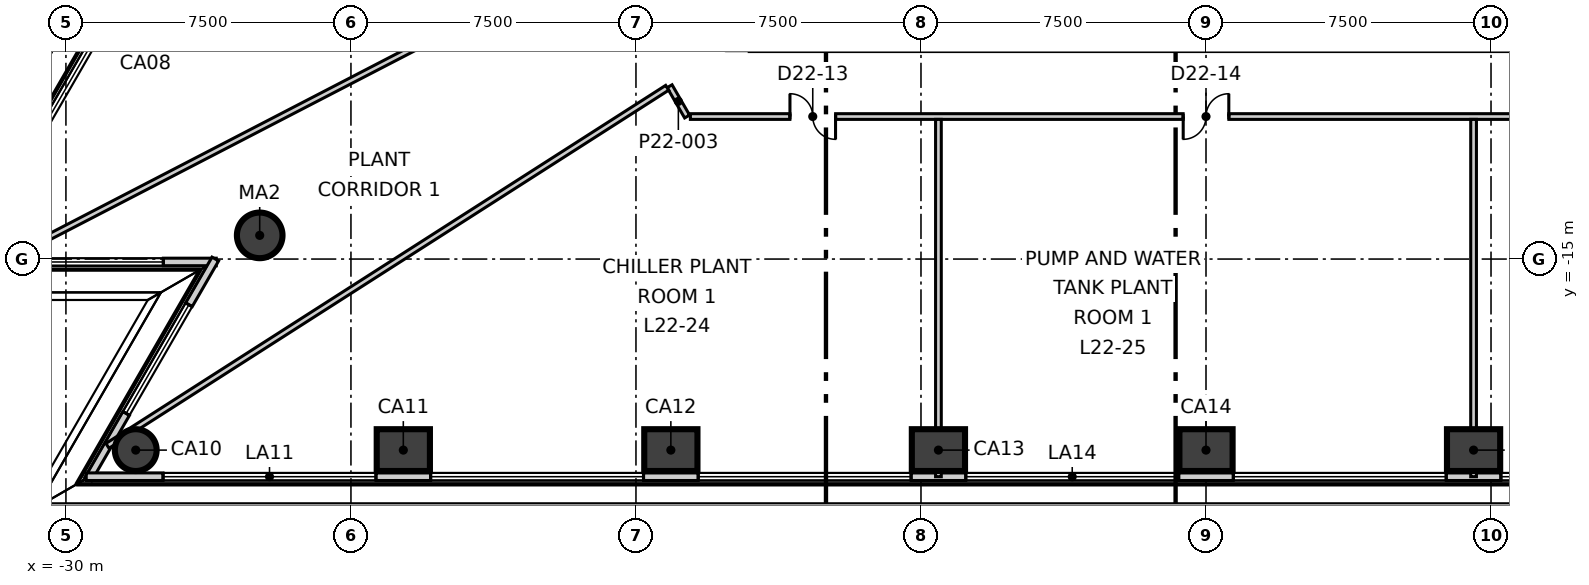
"""IFC4 building model, lengths in metres.
Left out: names, types, materials, properties, quantities, classifications, styles, units other than length and angle.
Written with IfcOpenShell. Run it as: python <this file> out.ifc"""

import sys

from ifc_helpers import new_model, si_unit, direction, frame, frame_2d, origin, origin_2d, place, context, subcontext, project, spatial, rectangle, circle, extrude, element, fill, save


model = new_model("IFC4")
c1 = context("Model", 3, precision=1e-05, world=origin(), true_north=direction((0.0, 1.0)))
c2 = subcontext(c1, "Body", "Model", "MODEL_VIEW")
j1 = project(units=[si_unit("LENGTHUNIT", "METRE"), si_unit("PLANEANGLEUNIT", "RADIAN")], contexts=[c1])
p1 = place(None, origin())
s1 = spatial("IfcSite", under=j1, at=p1, CompositionType="ELEMENT")
p2 = place(p1, origin())
s2 = spatial("IfcBuilding", under=s1, at=p2, CompositionType="ELEMENT")
p3 = place(p2, frame((0.0, 0.0, 99.8)))
s3 = spatial("IfcBuildingStorey", under=s2, at=p3, CompositionType="ELEMENT", Elevation=99.8)
p4 = place(p3, frame((-28.163, -20.027, -0.6), z_axis=(0.0, 0.0, 1.0), x_axis=(1.0, 0.0, 0.0)))
e1 = element("IfcColumn", 1, at=p4, inside=s3, PredefinedType="COLUMN", context=c2, shape_type="SweptSolid", body=[
    extrude(circle(Radius=0.55, at=origin_2d()), origin(), (0.0, 0.0, 1.0), 4.8),
])
for number, where, z_axis, x_axis in (
    (2, (-21.122, -20.027, -0.6), (0.0, 0.0, 1.0), (1.0, 0.0, 0.0)),
    (3, (-14.082, -20.027, -0.6), (0.0, 0.0, 1.0), (1.0, 0.0, 0.0)),
    (4, (-7.041, -20.027, -0.6), (0.0, 0.0, 1.0), (1.0, 0.0, 0.0)),
    (5, (0.0, -20.027, -0.6), (0.0, 0.0, 1.0), (1.0, 0.0, 0.0)),
    (6, (7.041, -20.027, -0.6), (0.0, 0.0, 1.0), (1.0, 0.0, 0.0)),
):
    element("IfcColumn", number, at=place(p3, frame(where, z_axis=z_axis, x_axis=x_axis)), inside=s3, PredefinedType="COLUMN", context=c2, shape_type="SweptSolid", body=[
        extrude(rectangle(XDim=1.4, YDim=1.1, at=origin_2d()), origin(), (0.0, 0.0, 1.0), 4.8),
    ])
p5 = place(p3, frame((-24.901, -14.377, -0.6), z_axis=(0.0, 0.0, 1.0), x_axis=(1.0, 0.0, 0.0)))
e7 = element("IfcColumn", 7, at=p5, inside=s3, PredefinedType="COLUMN", context=c2, shape_type="SweptSolid", body=[
    extrude(circle(Radius=0.6, at=origin_2d()), origin(), (0.0, 0.0, 1.0), 4.8),
])
p6 = place(p3, frame((-3.217, 35.882, 0.0), z_axis=(0.0, 0.0, 1.0), x_axis=(-0.499995323711, -0.866028103624, 0.0)))
e8 = element("IfcWall", 8, at=p6, inside=s3, PredefinedType="ELEMENTEDWALL", context=c2, shape_type="SweptSolid", body=[
    extrude(rectangle(XDim=58.913, YDim=0.2, at=frame_2d((29.456, 0.0))), origin(), (0.0, 0.0, 1.0), 4.2),
])
p7 = place(p6, frame((2.023, 0.0, 0.6)))
e9 = element("IfcOpeningElement", 9, at=p7, cuts=e8, PredefinedType="OPENING", context=c2, shape_type="SweptSolid", body=[
    extrude(rectangle(XDim=5.6, YDim=3.0, at=frame_2d((2.8, 1.5))), frame((0.0, 0.11, 0.0), z_axis=(0.0, -1.0, 0.0), x_axis=(1.0, 0.0, 0.0)), (0.0, 0.0, 1.0), 0.22),
])
p8 = place(p6, frame((9.064, 0.0, 0.6)))
e10 = element("IfcOpeningElement", 10, at=p8, cuts=e8, PredefinedType="OPENING", context=c2, shape_type="SweptSolid", body=[
    extrude(rectangle(XDim=5.6, YDim=3.0, at=frame_2d((2.8, 1.5))), frame((0.0, 0.11, 0.0), z_axis=(0.0, -1.0, 0.0), x_axis=(1.0, 0.0, 0.0)), (0.0, 0.0, 1.0), 0.22),
])
p9 = place(p6, frame((16.105, 0.0, 0.6)))
e11 = element("IfcOpeningElement", 11, at=p9, cuts=e8, PredefinedType="OPENING", context=c2, shape_type="SweptSolid", body=[
    extrude(rectangle(XDim=5.6, YDim=3.0, at=frame_2d((2.8, 1.5))), frame((0.0, 0.11, 0.0), z_axis=(0.0, -1.0, 0.0), x_axis=(1.0, 0.0, 0.0)), (0.0, 0.0, 1.0), 0.22),
])
p10 = place(p6, frame((23.146, 0.0, 0.6)))
e12 = element("IfcOpeningElement", 12, at=p10, cuts=e8, PredefinedType="OPENING", context=c2, shape_type="SweptSolid", body=[
    extrude(rectangle(XDim=5.6, YDim=3.0, at=frame_2d((2.8, 1.5))), frame((0.0, 0.11, 0.0), z_axis=(0.0, -1.0, 0.0), x_axis=(1.0, 0.0, 0.0)), (0.0, 0.0, 1.0), 0.22),
])
p11 = place(p6, frame((30.186, 0.0, 0.6)))
e13 = element("IfcOpeningElement", 13, at=p11, cuts=e8, PredefinedType="OPENING", context=c2, shape_type="SweptSolid", body=[
    extrude(rectangle(XDim=5.6, YDim=3.0, at=frame_2d((2.8, 1.5))), frame((0.0, 0.11, 0.0), z_axis=(0.0, -1.0, 0.0), x_axis=(1.0, 0.0, 0.0)), (0.0, 0.0, 1.0), 0.22),
])
p12 = place(p6, frame((37.227, 0.0, 0.6)))
e14 = element("IfcOpeningElement", 14, at=p12, cuts=e8, PredefinedType="OPENING", context=c2, shape_type="SweptSolid", body=[
    extrude(rectangle(XDim=5.6, YDim=3.0, at=frame_2d((2.8, 1.5))), frame((0.0, 0.11, 0.0), z_axis=(0.0, -1.0, 0.0), x_axis=(1.0, 0.0, 0.0)), (0.0, 0.0, 1.0), 0.22),
])
p13 = place(p6, frame((44.268, 0.0, 0.6)))
e15 = element("IfcOpeningElement", 15, at=p13, cuts=e8, PredefinedType="OPENING", context=c2, shape_type="SweptSolid", body=[
    extrude(rectangle(XDim=5.6, YDim=3.0, at=frame_2d((2.8, 1.5))), frame((0.0, 0.11, 0.0), z_axis=(0.0, -1.0, 0.0), x_axis=(1.0, 0.0, 0.0)), (0.0, 0.0, 1.0), 0.22),
])
p14 = place(p6, frame((51.309, 0.0, 0.6)))
e16 = element("IfcOpeningElement", 16, at=p14, cuts=e8, PredefinedType="OPENING", context=c2, shape_type="SweptSolid", body=[
    extrude(rectangle(XDim=5.6, YDim=3.0, at=frame_2d((2.8, 1.5))), frame((0.0, 0.11, 0.0), z_axis=(0.0, -1.0, 0.0), x_axis=(1.0, 0.0, 0.0)), (0.0, 0.0, 1.0), 0.22),
])
p15 = place(p3, frame((-32.728, -15.077, 0.0), z_axis=(0.0, 0.0, 1.0), x_axis=(1.0, 0.0, 0.0)))
e17 = element("IfcWall", 17, at=p15, inside=s3, PredefinedType="ELEMENTEDWALL", context=c2, shape_type="SweptSolid", body=[
    extrude(rectangle(XDim=6.684, YDim=0.2, at=frame_2d((3.342, 0.0))), origin(), (0.0, 0.0, 1.0), 4.2),
])
p16 = place(p15, frame((1.99, 0.0, 0.6)))
e18 = element("IfcOpeningElement", 18, at=p16, cuts=e17, PredefinedType="OPENING", context=c2, shape_type="SweptSolid", body=[
    extrude(rectangle(XDim=3.3, YDim=3.0, at=frame_2d((1.65, 1.5))), frame((0.0, 0.11, 0.0), z_axis=(0.0, -1.0, 0.0), x_axis=(1.0, 0.0, 0.0)), (0.0, 0.0, 1.0), 0.22),
])
p17 = place(p3, frame((-26.069, -14.999, 0.0), z_axis=(0.0, 0.0, 1.0), x_axis=(-0.499941663064, -0.866059082011, 0.0)))
e19 = element("IfcWall", 19, at=p17, inside=s3, PredefinedType="ELEMENTEDWALL", context=c2, shape_type="SweptSolid", body=[
    extrude(rectangle(XDim=6.684, YDim=0.2, at=frame_2d((3.342, 0.0))), origin(), (0.0, 0.0, 1.0), 4.2),
])
p18 = place(p17, frame((1.39, 0.0, 0.6)))
e20 = element("IfcOpeningElement", 20, at=p18, cuts=e19, PredefinedType="OPENING", context=c2, shape_type="SweptSolid", body=[
    extrude(rectangle(XDim=3.3, YDim=3.0, at=frame_2d((1.65, 1.5))), frame((0.0, 0.11, 0.0), z_axis=(0.0, -1.0, 0.0), x_axis=(1.0, 0.0, 0.0)), (0.0, 0.0, 1.0), 0.22),
])
p19 = place(p3, frame((-29.466, -20.727, 0.0), z_axis=(0.0, 0.0, 1.0), x_axis=(1.0, 0.0, 0.0)))
e21 = element("IfcWall", 21, at=p19, inside=s3, PredefinedType="ELEMENTEDWALL", context=c2, shape_type="SweptSolid", body=[
    extrude(rectangle(XDim=58.912, YDim=0.2, at=frame_2d((29.456, 0.0))), origin(), (0.0, 0.0, 1.0), 4.2),
])
p20 = place(p19, frame((2.023, 0.0, 0.6)))
e22 = element("IfcOpeningElement", 22, at=p20, cuts=e21, PredefinedType="OPENING", context=c2, shape_type="SweptSolid", body=[
    extrude(rectangle(XDim=5.6, YDim=3.0, at=frame_2d((2.8, 1.5))), frame((0.0, 0.11, 0.0), z_axis=(0.0, -1.0, 0.0), x_axis=(1.0, 0.0, 0.0)), (0.0, 0.0, 1.0), 0.22),
])
p21 = place(p19, frame((9.064, 0.0, 0.6)))
e23 = element("IfcOpeningElement", 23, at=p21, cuts=e21, PredefinedType="OPENING", context=c2, shape_type="SweptSolid", body=[
    extrude(rectangle(XDim=5.6, YDim=3.0, at=frame_2d((2.8, 1.5))), frame((0.0, 0.11, 0.0), z_axis=(0.0, -1.0, 0.0), x_axis=(1.0, 0.0, 0.0)), (0.0, 0.0, 1.0), 0.22),
])
p22 = place(p19, frame((16.105, 0.0, 0.6)))
e24 = element("IfcOpeningElement", 24, at=p22, cuts=e21, PredefinedType="OPENING", context=c2, shape_type="SweptSolid", body=[
    extrude(rectangle(XDim=5.6, YDim=3.0, at=frame_2d((2.8, 1.5))), frame((0.0, 0.11, 0.0), z_axis=(0.0, -1.0, 0.0), x_axis=(1.0, 0.0, 0.0)), (0.0, 0.0, 1.0), 0.22),
])
p23 = place(p19, frame((23.146, 0.0, 0.6)))
e25 = element("IfcOpeningElement", 25, at=p23, cuts=e21, PredefinedType="OPENING", context=c2, shape_type="SweptSolid", body=[
    extrude(rectangle(XDim=5.6, YDim=3.0, at=frame_2d((2.8, 1.5))), frame((0.0, 0.11, 0.0), z_axis=(0.0, -1.0, 0.0), x_axis=(1.0, 0.0, 0.0)), (0.0, 0.0, 1.0), 0.22),
])
p24 = place(p19, frame((30.186, 0.0, 0.6)))
e26 = element("IfcOpeningElement", 26, at=p24, cuts=e21, PredefinedType="OPENING", context=c2, shape_type="SweptSolid", body=[
    extrude(rectangle(XDim=5.6, YDim=3.0, at=frame_2d((2.8, 1.5))), frame((0.0, 0.11, 0.0), z_axis=(0.0, -1.0, 0.0), x_axis=(1.0, 0.0, 0.0)), (0.0, 0.0, 1.0), 0.22),
])
p25 = place(p19, frame((37.227, 0.0, 0.6)))
e27 = element("IfcOpeningElement", 27, at=p25, cuts=e21, PredefinedType="OPENING", context=c2, shape_type="SweptSolid", body=[
    extrude(rectangle(XDim=5.6, YDim=3.0, at=frame_2d((2.8, 1.5))), frame((0.0, 0.11, 0.0), z_axis=(0.0, -1.0, 0.0), x_axis=(1.0, 0.0, 0.0)), (0.0, 0.0, 1.0), 0.22),
])
p26 = place(p19, frame((44.268, 0.0, 0.6)))
e28 = element("IfcOpeningElement", 28, at=p26, cuts=e21, PredefinedType="OPENING", context=c2, shape_type="SweptSolid", body=[
    extrude(rectangle(XDim=5.6, YDim=3.0, at=frame_2d((2.8, 1.5))), frame((0.0, 0.11, 0.0), z_axis=(0.0, -1.0, 0.0), x_axis=(1.0, 0.0, 0.0)), (0.0, 0.0, 1.0), 0.22),
])
p27 = place(p19, frame((51.309, 0.0, 0.6)))
e29 = element("IfcOpeningElement", 29, at=p27, cuts=e21, PredefinedType="OPENING", context=c2, shape_type="SweptSolid", body=[
    extrude(rectangle(XDim=5.6, YDim=3.0, at=frame_2d((2.8, 1.5))), frame((0.0, 0.11, 0.0), z_axis=(0.0, -1.0, 0.0), x_axis=(1.0, 0.0, 0.0)), (0.0, 0.0, 1.0), 0.22),
])
p28 = place(p3, frame((32.683, -15.155, 0.0), z_axis=(0.0, 0.0, 1.0), x_axis=(-0.499995323711, 0.866028103624, 0.0)))
e30 = element("IfcWall", 30, at=p28, inside=s3, PredefinedType="ELEMENTEDWALL", context=c2, shape_type="SweptSolid", body=[
    extrude(rectangle(XDim=58.913, YDim=0.2, at=frame_2d((29.456, 0.0))), origin(), (0.0, 0.0, 1.0), 4.2),
])
p29 = place(p28, frame((2.023, 0.0, 0.6)))
e31 = element("IfcOpeningElement", 31, at=p29, cuts=e30, PredefinedType="OPENING", context=c2, shape_type="SweptSolid", body=[
    extrude(rectangle(XDim=5.6, YDim=3.0, at=frame_2d((2.8, 1.5))), frame((0.0, 0.11, 0.0), z_axis=(0.0, -1.0, 0.0), x_axis=(1.0, 0.0, 0.0)), (0.0, 0.0, 1.0), 0.22),
])
p30 = place(p28, frame((9.064, 0.0, 0.6)))
e32 = element("IfcOpeningElement", 32, at=p30, cuts=e30, PredefinedType="OPENING", context=c2, shape_type="SweptSolid", body=[
    extrude(rectangle(XDim=5.6, YDim=3.0, at=frame_2d((2.8, 1.5))), frame((0.0, 0.11, 0.0), z_axis=(0.0, -1.0, 0.0), x_axis=(1.0, 0.0, 0.0)), (0.0, 0.0, 1.0), 0.22),
])
p31 = place(p28, frame((16.105, 0.0, 0.6)))
e33 = element("IfcOpeningElement", 33, at=p31, cuts=e30, PredefinedType="OPENING", context=c2, shape_type="SweptSolid", body=[
    extrude(rectangle(XDim=5.6, YDim=3.0, at=frame_2d((2.8, 1.5))), frame((0.0, 0.11, 0.0), z_axis=(0.0, -1.0, 0.0), x_axis=(1.0, 0.0, 0.0)), (0.0, 0.0, 1.0), 0.22),
])
p32 = place(p28, frame((23.146, 0.0, 0.6)))
e34 = element("IfcOpeningElement", 34, at=p32, cuts=e30, PredefinedType="OPENING", context=c2, shape_type="SweptSolid", body=[
    extrude(rectangle(XDim=5.6, YDim=3.0, at=frame_2d((2.8, 1.5))), frame((0.0, 0.11, 0.0), z_axis=(0.0, -1.0, 0.0), x_axis=(1.0, 0.0, 0.0)), (0.0, 0.0, 1.0), 0.22),
])
p33 = place(p28, frame((30.187, 0.0, 0.6)))
e35 = element("IfcOpeningElement", 35, at=p33, cuts=e30, PredefinedType="OPENING", context=c2, shape_type="SweptSolid", body=[
    extrude(rectangle(XDim=5.6, YDim=3.0, at=frame_2d((2.8, 1.5))), frame((0.0, 0.11, 0.0), z_axis=(0.0, -1.0, 0.0), x_axis=(1.0, 0.0, 0.0)), (0.0, 0.0, 1.0), 0.22),
])
p34 = place(p28, frame((37.228, 0.0, 0.6)))
e36 = element("IfcOpeningElement", 36, at=p34, cuts=e30, PredefinedType="OPENING", context=c2, shape_type="SweptSolid", body=[
    extrude(rectangle(XDim=5.6, YDim=3.0, at=frame_2d((2.8, 1.5))), frame((0.0, 0.11, 0.0), z_axis=(0.0, -1.0, 0.0), x_axis=(1.0, 0.0, 0.0)), (0.0, 0.0, 1.0), 0.22),
])
p35 = place(p28, frame((44.268, 0.0, 0.6)))
e37 = element("IfcOpeningElement", 37, at=p35, cuts=e30, PredefinedType="OPENING", context=c2, shape_type="SweptSolid", body=[
    extrude(rectangle(XDim=5.6, YDim=3.0, at=frame_2d((2.8, 1.5))), frame((0.0, 0.11, 0.0), z_axis=(0.0, -1.0, 0.0), x_axis=(1.0, 0.0, 0.0)), (0.0, 0.0, 1.0), 0.22),
])
p36 = place(p28, frame((51.309, 0.0, 0.6)))
e38 = element("IfcOpeningElement", 38, at=p36, cuts=e30, PredefinedType="OPENING", context=c2, shape_type="SweptSolid", body=[
    extrude(rectangle(XDim=5.6, YDim=3.0, at=frame_2d((2.8, 1.5))), frame((0.0, 0.11, 0.0), z_axis=(0.0, -1.0, 0.0), x_axis=(1.0, 0.0, 0.0)), (0.0, 0.0, 1.0), 0.22),
])
p37 = place(p3, frame((-14.115, -10.452, 0.0), z_axis=(0.0, 0.0, 1.0), x_axis=(0.500127537037, -0.865951757719, 0.0)))
e39 = element("IfcWall", 39, at=p37, inside=s3, PredefinedType="PARTITIONING", context=c2, shape_type="SweptSolid", body=[
    extrude(rectangle(XDim=0.922, YDim=0.15, at=frame_2d((0.461, 0.0))), origin(), (0.0, 0.0, 1.0), 4.2),
])
p38 = place(p3, frame((-31.713, -15.077, 0.0), z_axis=(0.0, 0.0, 1.0), x_axis=(0.887959302536, 0.459922033654, 0.0)))
e40 = element("IfcWall", 40, at=p38, inside=s3, PredefinedType="PARTITIONING", context=c2, shape_type="SweptSolid", body=[
    extrude(rectangle(XDim=17.496, YDim=0.15, at=frame_2d((8.748, 0.0))), origin(), (0.0, 0.0, 1.0), 3.4),
])
p39 = place(p3, frame((-28.907, -19.915, 0.0), z_axis=(0.0, 0.0, 1.0), x_axis=(0.842386762203, 0.53887340152, 0.0)))
e41 = element("IfcWall", 41, at=p39, inside=s3, PredefinedType="PARTITIONING", context=c2, shape_type="SweptSolid", body=[
    extrude(rectangle(XDim=17.485, YDim=0.15, at=frame_2d((8.742, 0.0))), origin(), (0.0, 0.0, 1.0), 3.4),
])
p40 = place(p3, frame((-13.568, -11.25, 0.0), z_axis=(0.0, 0.0, 1.0), x_axis=(1.0, 0.0, 0.0)))
e42 = element("IfcWall", 42, at=p40, inside=s3, PredefinedType="PARTITIONING", context=c2, shape_type="SweptSolid", body=[
    extrude(rectangle(XDim=27.222, YDim=0.15, at=frame_2d((13.611, 0.0))), origin(), (0.0, 0.0, 1.0), 4.2),
])
p41 = place(p40, frame((2.62, 0.0, 0.0)))
e43 = element("IfcOpeningElement", 43, at=p41, cuts=e42, PredefinedType="OPENING", context=c2, shape_type="SweptSolid", body=[
    extrude(rectangle(XDim=1.2, YDim=2.1, at=frame_2d((0.6, 1.05))), frame((0.0, 0.085, 0.0), z_axis=(0.0, -1.0, 0.0), x_axis=(1.0, 0.0, 0.0)), (0.0, 0.0, 1.0), 0.17),
])
p42 = place(p40, frame((12.968, 0.0, 0.0)))
e44 = element("IfcOpeningElement", 44, at=p42, cuts=e42, PredefinedType="OPENING", context=c2, shape_type="SweptSolid", body=[
    extrude(rectangle(XDim=1.2, YDim=2.1, at=frame_2d((0.6, 1.05))), frame((0.0, 0.085, 0.0), z_axis=(0.0, -1.0, 0.0), x_axis=(1.0, 0.0, 0.0)), (0.0, 0.0, 1.0), 0.17),
])
p43 = place(p40, frame((23.316, 0.0, 0.0)))
e45 = element("IfcOpeningElement", 45, at=p43, cuts=e42, PredefinedType="OPENING", context=c2, shape_type="SweptSolid", body=[
    extrude(rectangle(XDim=1.2, YDim=2.1, at=frame_2d((0.6, 1.05))), frame((0.0, 0.085, 0.0), z_axis=(0.0, -1.0, 0.0), x_axis=(1.0, 0.0, 0.0)), (0.0, 0.0, 1.0), 0.17),
])
for number, where, z_axis, x_axis in (
    (46, (-7.041, -20.727, 0.0), (0.0, 0.0, 1.0), (0.0, 1.0, 0.0)),
    (47, (7.041, -20.727, 0.0), (0.0, 0.0, 1.0), (0.0, 1.0, 0.0)),
):
    element("IfcWall", number, at=place(p3, frame(where, z_axis=z_axis, x_axis=x_axis)), inside=s3, PredefinedType="PARTITIONING", context=c2, shape_type="SweptSolid", body=[
        extrude(rectangle(XDim=9.402, YDim=0.15, at=frame_2d((4.701, 0.0))), origin(), (0.0, 0.0, 1.0), 4.2),
    ])
p44 = place(p14, origin())
e48 = element("IfcWindow", 48, at=p44, inside=s3, PartitioningType="SINGLE_PANEL", PredefinedType="WINDOW", context=c2, shape_type="SweptSolid", body=[
    extrude(rectangle(XDim=5.6, YDim=3.0, at=frame_2d((2.8, 1.5))), frame((0.0, 0.03, 0.0), z_axis=(0.0, -1.0, 0.0), x_axis=(1.0, 0.0, 0.0)), (0.0, 0.0, 1.0), 0.06),
])
fill(e16, e48)
p45 = place(p16, origin())
e49 = element("IfcWindow", 49, at=p45, inside=s3, PartitioningType="SINGLE_PANEL", PredefinedType="WINDOW", context=c2, shape_type="SweptSolid", body=[
    extrude(rectangle(XDim=3.3, YDim=3.0, at=frame_2d((1.65, 1.5))), frame((0.0, 0.03, 0.0), z_axis=(0.0, -1.0, 0.0), x_axis=(1.0, 0.0, 0.0)), (0.0, 0.0, 1.0), 0.06),
])
fill(e18, e49)
p46 = place(p18, origin())
e50 = element("IfcWindow", 50, at=p46, inside=s3, PartitioningType="SINGLE_PANEL", PredefinedType="WINDOW", context=c2, shape_type="SweptSolid", body=[
    extrude(rectangle(XDim=3.3, YDim=3.0, at=frame_2d((1.65, 1.5))), frame((0.0, 0.03, 0.0), z_axis=(0.0, -1.0, 0.0), x_axis=(1.0, 0.0, 0.0)), (0.0, 0.0, 1.0), 0.06),
])
fill(e20, e50)
p47 = place(p20, origin())
e51 = element("IfcWindow", 51, at=p47, inside=s3, PartitioningType="SINGLE_PANEL", PredefinedType="WINDOW", context=c2, shape_type="SweptSolid", body=[
    extrude(rectangle(XDim=5.6, YDim=3.0, at=frame_2d((2.8, 1.5))), frame((0.0, 0.03, 0.0), z_axis=(0.0, -1.0, 0.0), x_axis=(1.0, 0.0, 0.0)), (0.0, 0.0, 1.0), 0.06),
])
fill(e22, e51)
p48 = place(p21, origin())
e52 = element("IfcWindow", 52, at=p48, inside=s3, PartitioningType="SINGLE_PANEL", PredefinedType="WINDOW", context=c2, shape_type="SweptSolid", body=[
    extrude(rectangle(XDim=5.6, YDim=3.0, at=frame_2d((2.8, 1.5))), frame((0.0, 0.03, 0.0), z_axis=(0.0, -1.0, 0.0), x_axis=(1.0, 0.0, 0.0)), (0.0, 0.0, 1.0), 0.06),
])
fill(e23, e52)
p49 = place(p22, origin())
e53 = element("IfcWindow", 53, at=p49, inside=s3, PartitioningType="SINGLE_PANEL", PredefinedType="WINDOW", context=c2, shape_type="SweptSolid", body=[
    extrude(rectangle(XDim=5.6, YDim=3.0, at=frame_2d((2.8, 1.5))), frame((0.0, 0.03, 0.0), z_axis=(0.0, -1.0, 0.0), x_axis=(1.0, 0.0, 0.0)), (0.0, 0.0, 1.0), 0.06),
])
fill(e24, e53)
p50 = place(p23, origin())
e54 = element("IfcWindow", 54, at=p50, inside=s3, PartitioningType="SINGLE_PANEL", PredefinedType="WINDOW", context=c2, shape_type="SweptSolid", body=[
    extrude(rectangle(XDim=5.6, YDim=3.0, at=frame_2d((2.8, 1.5))), frame((0.0, 0.03, 0.0), z_axis=(0.0, -1.0, 0.0), x_axis=(1.0, 0.0, 0.0)), (0.0, 0.0, 1.0), 0.06),
])
fill(e25, e54)
p51 = place(p24, origin())
e55 = element("IfcWindow", 55, at=p51, inside=s3, PartitioningType="SINGLE_PANEL", PredefinedType="WINDOW", context=c2, shape_type="SweptSolid", body=[
    extrude(rectangle(XDim=5.6, YDim=3.0, at=frame_2d((2.8, 1.5))), frame((0.0, 0.03, 0.0), z_axis=(0.0, -1.0, 0.0), x_axis=(1.0, 0.0, 0.0)), (0.0, 0.0, 1.0), 0.06),
])
fill(e26, e55)
p52 = place(p25, origin())
e56 = element("IfcWindow", 56, at=p52, inside=s3, PartitioningType="SINGLE_PANEL", PredefinedType="WINDOW", context=c2, shape_type="SweptSolid", body=[
    extrude(rectangle(XDim=5.6, YDim=3.0, at=frame_2d((2.8, 1.5))), frame((0.0, 0.03, 0.0), z_axis=(0.0, -1.0, 0.0), x_axis=(1.0, 0.0, 0.0)), (0.0, 0.0, 1.0), 0.06),
])
fill(e27, e56)
p53 = place(p41, origin())
e57 = element("IfcDoor", 57, at=p53, inside=s3, OperationType="DOUBLE_DOOR_SINGLE_SWING", PredefinedType="DOOR", context=c2, shape_type="SweptSolid", body=[
    extrude(rectangle(XDim=1.2, YDim=2.1, at=frame_2d((0.6, 1.05))), frame((0.0, 0.025, 0.0), z_axis=(0.0, -1.0, 0.0), x_axis=(1.0, 0.0, 0.0)), (0.0, 0.0, 1.0), 0.05),
])
fill(e43, e57)
p54 = place(p42, origin())
e58 = element("IfcDoor", 58, at=p54, inside=s3, OperationType="DOUBLE_DOOR_SINGLE_SWING", PredefinedType="DOOR", context=c2, shape_type="SweptSolid", body=[
    extrude(rectangle(XDim=1.2, YDim=2.1, at=frame_2d((0.6, 1.05))), frame((0.0, 0.025, 0.0), z_axis=(0.0, -1.0, 0.0), x_axis=(1.0, 0.0, 0.0)), (0.0, 0.0, 1.0), 0.05),
])
fill(e44, e58)
save(model, sys.argv[1])
